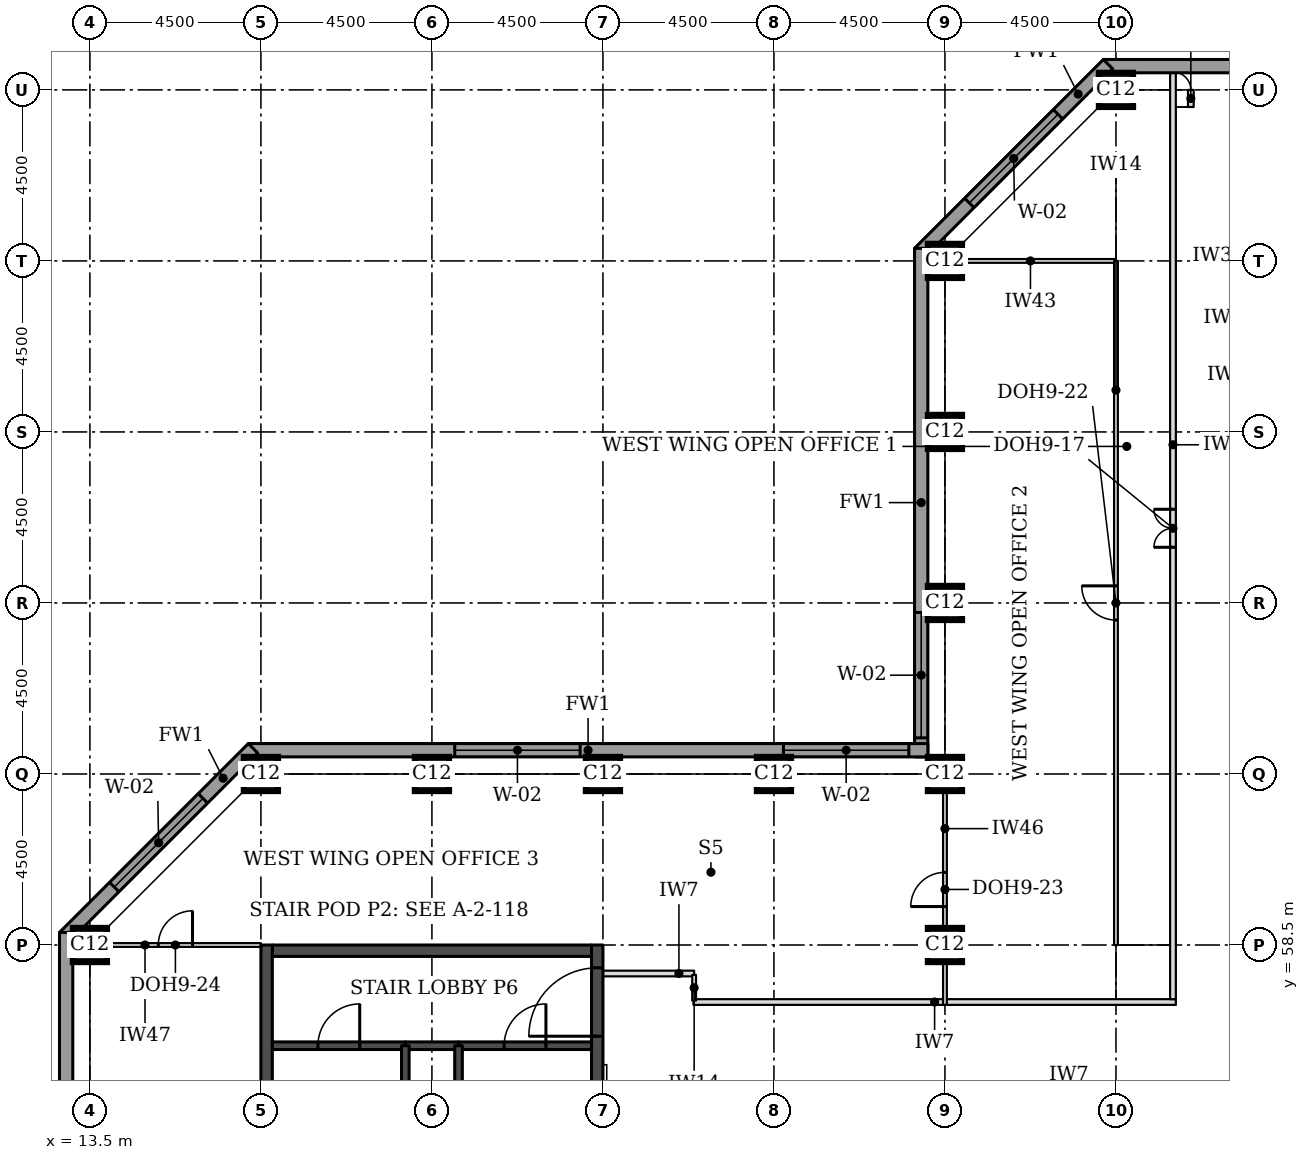
"""IFC4 building model, lengths in metres.
Left out: names, types, materials, properties, quantities, classifications, styles, units other than length and angle.
Written with IfcOpenShell. Run it as: python <this file> out.ifc"""

import sys

from ifc_helpers import new_model, si_unit, direction, frame, frame_2d, origin, origin_2d, place, context, subcontext, project, spatial, rectangle, extrude, element, fill, save


model = new_model("IFC4")
c1 = context("Model", 3, precision=1e-05, world=origin(), true_north=direction((0.0, 1.0)))
c2 = subcontext(c1, "Body", "Model", "MODEL_VIEW")
j1 = project(units=[si_unit("LENGTHUNIT", "METRE"), si_unit("PLANEANGLEUNIT", "RADIAN")], contexts=[c1])
p1 = place(None, origin())
s1 = spatial("IfcSite", under=j1, at=p1, CompositionType="ELEMENT")
p2 = place(p1, origin())
s2 = spatial("IfcBuilding", under=s1, at=p2, CompositionType="ELEMENT")
p3 = place(p2, frame((0.0, 0.0, 219.3)))
s3 = spatial("IfcBuildingStorey", under=s2, at=p3, CompositionType="ELEMENT", Elevation=219.3)
for number, where, z_axis, x_axis in (
    (1, (13.5, 58.5, 0.0), (0.0, 0.0, 1.0), (1.0, 0.0, 0.0)),
    (2, (36.0, 58.5, 0.0), (0.0, 0.0, 1.0), (1.0, 0.0, 0.0)),
    (3, (18.0, 63.0, 0.0), (0.0, 0.0, 1.0), (1.0, 0.0, 0.0)),
    (4, (22.5, 63.0, 0.0), (0.0, 0.0, 1.0), (1.0, 0.0, 0.0)),
    (5, (27.0, 63.0, 0.0), (0.0, 0.0, 1.0), (1.0, 0.0, 0.0)),
    (6, (31.5, 63.0, 0.0), (0.0, 0.0, 1.0), (1.0, 0.0, 0.0)),
    (7, (36.0, 63.0, 0.0), (0.0, 0.0, 1.0), (1.0, 0.0, 0.0)),
    (8, (36.0, 67.5, 0.0), (0.0, 0.0, 1.0), (1.0, 0.0, 0.0)),
    (9, (36.0, 72.0, 0.0), (0.0, 0.0, 1.0), (1.0, 0.0, 0.0)),
    (10, (36.0, 76.5, 0.0), (0.0, 0.0, 1.0), (1.0, 0.0, 0.0)),
    (11, (40.5, 81.0, 0.0), (0.0, 0.0, 1.0), (1.0, 0.0, 0.0)),
):
    element("IfcColumn", number, at=place(p3, frame(where, z_axis=z_axis, x_axis=x_axis)), inside=s3, PredefinedType="COLUMN", context=c2, shape_type="SweptSolid", body=[
        extrude(rectangle(XDim=0.9, YDim=0.9, at=origin_2d()), origin(), (0.0, 0.0, 1.0), 3.7),
    ])
p4 = place(p3, frame((18.3, 58.35, 0.0), z_axis=(0.0, 0.0, 1.0), x_axis=(1.0, 0.0, 0.0)))
e12 = element("IfcWall", 12, at=p4, inside=s3, PredefinedType="SHEAR", context=c2, shape_type="SweptSolid", body=[
    extrude(rectangle(XDim=8.4, YDim=0.3, at=frame_2d((4.2, 0.0))), origin(), (0.0, 0.0, 1.0), 3.7),
])
p5 = place(p3, frame((18.15, 49.5, 0.0), z_axis=(0.0, 0.0, 1.0), x_axis=(0.0, 1.0, 0.0)))
e13 = element("IfcWall", 13, at=p5, inside=s3, PredefinedType="SHEAR", context=c2, shape_type="SweptSolid", body=[
    extrude(rectangle(XDim=9.0, YDim=0.3, at=frame_2d((4.5, 0.0))), origin(), (0.0, 0.0, 1.0), 3.7),
])
p6 = place(p3, frame((26.85, 49.5, 0.0), z_axis=(0.0, 0.0, 1.0), x_axis=(0.0, 1.0, 0.0)))
e14 = element("IfcWall", 14, at=p6, inside=s3, PredefinedType="SHEAR", context=c2, shape_type="SweptSolid", body=[
    extrude(rectangle(XDim=9.0, YDim=0.3, at=frame_2d((4.5, 0.0))), origin(), (0.0, 0.0, 1.0), 3.7),
])
p7 = place(p6, frame((6.6, 0.0, 0.0)))
e15 = element("IfcOpeningElement", 15, at=p7, cuts=e14, PredefinedType="OPENING", context=c2, shape_type="SweptSolid", body=[
    extrude(rectangle(XDim=1.8, YDim=2.1, at=frame_2d((0.9, 1.05))), frame((0.0, 0.16, 0.0), z_axis=(0.0, -1.0, 0.0), x_axis=(1.0, 0.0, 0.0)), (0.0, 0.0, 1.0), 0.32),
])
p8 = place(p3, frame((72.331, 81.625, 0.0), z_axis=(0.0, 0.0, 1.0), x_axis=(-1.0, 0.0, 0.0)))
e16 = element("IfcWall", 16, at=p8, inside=s3, PredefinedType="STANDARD", context=c2, shape_type="SweptSolid", body=[
    extrude(rectangle(XDim=32.163, YDim=0.35, at=frame_2d((16.081, 0.0))), origin(), (0.0, 0.0, 1.0), 3.525),
])
p9 = place(p8, frame((5.431, 0.0, 0.9)))
e17 = element("IfcOpeningElement", 17, at=p9, cuts=e16, PredefinedType="OPENING", context=c2, shape_type="SweptSolid", body=[
    extrude(rectangle(XDim=3.3, YDim=1.9, at=frame_2d((1.65, 0.95))), frame((0.0, 0.185, 0.0), z_axis=(0.0, -1.0, 0.0), x_axis=(1.0, 0.0, 0.0)), (0.0, 0.0, 1.0), 0.37),
])
p10 = place(p8, frame((9.931, 0.0, 0.9)))
e18 = element("IfcOpeningElement", 18, at=p10, cuts=e16, PredefinedType="OPENING", context=c2, shape_type="SweptSolid", body=[
    extrude(rectangle(XDim=3.3, YDim=1.9, at=frame_2d((1.65, 0.95))), frame((0.0, 0.185, 0.0), z_axis=(0.0, -1.0, 0.0), x_axis=(1.0, 0.0, 0.0)), (0.0, 0.0, 1.0), 0.37),
])
p11 = place(p8, frame((14.431, 0.0, 0.9)))
e19 = element("IfcOpeningElement", 19, at=p11, cuts=e16, PredefinedType="OPENING", context=c2, shape_type="SweptSolid", body=[
    extrude(rectangle(XDim=3.3, YDim=1.9, at=frame_2d((1.65, 0.95))), frame((0.0, 0.185, 0.0), z_axis=(0.0, -1.0, 0.0), x_axis=(1.0, 0.0, 0.0)), (0.0, 0.0, 1.0), 0.37),
])
p12 = place(p8, frame((18.931, 0.0, 0.9)))
e20 = element("IfcOpeningElement", 20, at=p12, cuts=e16, PredefinedType="OPENING", context=c2, shape_type="SweptSolid", body=[
    extrude(rectangle(XDim=3.3, YDim=1.9, at=frame_2d((1.65, 0.95))), frame((0.0, 0.185, 0.0), z_axis=(0.0, -1.0, 0.0), x_axis=(1.0, 0.0, 0.0)), (0.0, 0.0, 1.0), 0.37),
])
p13 = place(p8, frame((23.431, 0.0, 0.9)))
e21 = element("IfcOpeningElement", 21, at=p13, cuts=e16, PredefinedType="OPENING", context=c2, shape_type="SweptSolid", body=[
    extrude(rectangle(XDim=3.3, YDim=1.9, at=frame_2d((1.65, 0.95))), frame((0.0, 0.185, 0.0), z_axis=(0.0, -1.0, 0.0), x_axis=(1.0, 0.0, 0.0)), (0.0, 0.0, 1.0), 0.37),
])
p14 = place(p3, frame((40.292, 81.676, 0.0), z_axis=(0.0, 0.0, 1.0), x_axis=(-0.707106781187, -0.707106781187, 0.0)))
e22 = element("IfcWall", 22, at=p14, inside=s3, PredefinedType="STANDARD", context=c2, shape_type="SweptSolid", body=[
    extrude(rectangle(XDim=7.027, YDim=0.35, at=frame_2d((3.513, 0.0))), origin(), (0.0, 0.0, 1.0), 3.525),
])
p15 = place(p14, frame((1.863, 0.0, 0.9)))
e23 = element("IfcOpeningElement", 23, at=p15, cuts=e22, PredefinedType="OPENING", context=c2, shape_type="SweptSolid", body=[
    extrude(rectangle(XDim=3.3, YDim=1.9, at=frame_2d((1.65, 0.95))), frame((0.0, 0.185, 0.0), z_axis=(0.0, -1.0, 0.0), x_axis=(1.0, 0.0, 0.0)), (0.0, 0.0, 1.0), 0.37),
])
p16 = place(p3, frame((35.375, 76.831, 0.0), z_axis=(0.0, 0.0, 1.0), x_axis=(0.0, -1.0, 0.0)))
e24 = element("IfcWall", 24, at=p16, inside=s3, PredefinedType="STANDARD", context=c2, shape_type="SweptSolid", body=[
    extrude(rectangle(XDim=13.381, YDim=0.35, at=frame_2d((6.691, 0.0))), origin(), (0.0, 0.0, 1.0), 3.525),
])
p17 = place(p16, frame((9.581, 0.0, 0.9)))
e25 = element("IfcOpeningElement", 25, at=p17, cuts=e24, PredefinedType="OPENING", context=c2, shape_type="SweptSolid", body=[
    extrude(rectangle(XDim=3.3, YDim=1.9, at=frame_2d((1.65, 0.95))), frame((0.0, 0.185, 0.0), z_axis=(0.0, -1.0, 0.0), x_axis=(1.0, 0.0, 0.0)), (0.0, 0.0, 1.0), 0.37),
])
p18 = place(p3, frame((35.55, 63.625, 0.0), z_axis=(0.0, 0.0, 1.0), x_axis=(-1.0, 0.0, 0.0)))
e26 = element("IfcWall", 26, at=p18, inside=s3, PredefinedType="STANDARD", context=c2, shape_type="SweptSolid", body=[
    extrude(rectangle(XDim=17.881, YDim=0.35, at=frame_2d((8.941, 0.0))), origin(), (0.0, 0.0, 1.0), 3.525),
])
p19 = place(p18, frame((0.5, 0.0, 0.9)))
e27 = element("IfcOpeningElement", 27, at=p19, cuts=e26, PredefinedType="OPENING", context=c2, shape_type="SweptSolid", body=[
    extrude(rectangle(XDim=3.3, YDim=1.9, at=frame_2d((1.65, 0.95))), frame((0.0, 0.185, 0.0), z_axis=(0.0, -1.0, 0.0), x_axis=(1.0, 0.0, 0.0)), (0.0, 0.0, 1.0), 0.37),
])
p20 = place(p18, frame((9.15, 0.0, 0.9)))
e28 = element("IfcOpeningElement", 28, at=p20, cuts=e26, PredefinedType="OPENING", context=c2, shape_type="SweptSolid", body=[
    extrude(rectangle(XDim=3.3, YDim=1.9, at=frame_2d((1.65, 0.95))), frame((0.0, 0.185, 0.0), z_axis=(0.0, -1.0, 0.0), x_axis=(1.0, 0.0, 0.0)), (0.0, 0.0, 1.0), 0.37),
])
p21 = place(p3, frame((17.792, 63.676, 0.0), z_axis=(0.0, 0.0, 1.0), x_axis=(-0.707106781187, -0.707106781187, 0.0)))
e29 = element("IfcWall", 29, at=p21, inside=s3, PredefinedType="STANDARD", context=c2, shape_type="SweptSolid", body=[
    extrude(rectangle(XDim=7.027, YDim=0.35, at=frame_2d((3.513, 0.0))), origin(), (0.0, 0.0, 1.0), 3.525),
])
p22 = place(p21, frame((1.863, 0.0, 0.9)))
e30 = element("IfcOpeningElement", 30, at=p22, cuts=e29, PredefinedType="OPENING", context=c2, shape_type="SweptSolid", body=[
    extrude(rectangle(XDim=3.3, YDim=1.9, at=frame_2d((1.65, 0.95))), frame((0.0, 0.185, 0.0), z_axis=(0.0, -1.0, 0.0), x_axis=(1.0, 0.0, 0.0)), (0.0, 0.0, 1.0), 0.37),
])
p23 = place(p3, frame((12.875, 58.831, 0.0), z_axis=(0.0, 0.0, 1.0), x_axis=(0.0, -1.0, 0.0)))
e31 = element("IfcWall", 31, at=p23, inside=s3, PredefinedType="STANDARD", context=c2, shape_type="SweptSolid", body=[
    extrude(rectangle(XDim=14.163, YDim=0.35, at=frame_2d((7.081, 0.0))), origin(), (0.0, 0.0, 1.0), 3.525),
])
p24 = place(p23, frame((5.431, 0.0, 0.9)))
e32 = element("IfcOpeningElement", 32, at=p24, cuts=e31, PredefinedType="OPENING", context=c2, shape_type="SweptSolid", body=[
    extrude(rectangle(XDim=3.3, YDim=1.9, at=frame_2d((1.65, 0.95))), frame((0.0, 0.185, 0.0), z_axis=(0.0, -1.0, 0.0), x_axis=(1.0, 0.0, 0.0)), (0.0, 0.0, 1.0), 0.37),
])
p25 = place(p3, frame((29.38, 57.0, 0.0), z_axis=(0.0, 0.0, 1.0), x_axis=(1.0, 0.0, 0.0)))
e33 = element("IfcWall", 33, at=p25, inside=s3, PredefinedType="PARTITIONING", context=c2, shape_type="SweptSolid", body=[
    extrude(rectangle(XDim=12.695, YDim=0.15, at=frame_2d((6.348, 0.0))), origin(), (0.0, 0.0, 1.0), 3.55),
])
p26 = place(p3, frame((42.0, 57.075, 0.0), z_axis=(0.0, 0.0, 1.0), x_axis=(0.0, 1.0, 0.0)))
e34 = element("IfcWall", 34, at=p26, inside=s3, PredefinedType="PARTITIONING", context=c2, shape_type="SweptSolid", body=[
    extrude(rectangle(XDim=24.375, YDim=0.15, at=frame_2d((12.188, 0.0))), origin(), (0.0, 0.0, 1.0), 3.55),
])
p27 = place(p26, frame((11.89, 0.0, 0.0)))
e35 = element("IfcOpeningElement", 35, at=p27, cuts=e34, PredefinedType="OPENING", context=c2, shape_type="SweptSolid", body=[
    extrude(rectangle(XDim=1.0, YDim=2.1, at=frame_2d((0.5, 1.05))), frame((0.0, 0.085, 0.0), z_axis=(0.0, -1.0, 0.0), x_axis=(1.0, 0.0, 0.0)), (0.0, 0.0, 1.0), 0.17),
])
p28 = place(p3, frame((36.0, 76.5, 0.0), z_axis=(0.0, 0.0, 1.0), x_axis=(1.0, 0.0, 0.0)))
e36 = element("IfcWall", 36, at=p28, inside=s3, PredefinedType="PARTITIONING", context=c2, shape_type="SweptSolid", body=[
    extrude(rectangle(XDim=4.5, YDim=0.1, at=frame_2d((2.25, 0.0))), origin(), (0.0, 0.0, 1.0), 3.096),
])
p29 = place(p3, frame((40.5, 76.5, 0.0), z_axis=(0.0, 0.0, 1.0), x_axis=(0.0, -1.0, 0.0)))
e37 = element("IfcWall", 37, at=p29, inside=s3, PredefinedType="PARTITIONING", context=c2, shape_type="SweptSolid", body=[
    extrude(rectangle(XDim=18.0, YDim=0.1, at=frame_2d((9.0, 0.0))), origin(), (0.0, 0.0, 1.0), 3.55),
])
p30 = place(p29, frame((8.55, 0.0, 0.0)))
e38 = element("IfcOpeningElement", 38, at=p30, cuts=e37, PredefinedType="OPENING", context=c2, shape_type="SweptSolid", body=[
    extrude(rectangle(XDim=0.9, YDim=2.1, at=frame_2d((0.45, 1.05))), frame((0.0, 0.06, 0.0), z_axis=(0.0, -1.0, 0.0), x_axis=(1.0, 0.0, 0.0)), (0.0, 0.0, 1.0), 0.12),
])
p31 = place(p3, frame((36.0, 63.0, 0.0), z_axis=(0.0, 0.0, 1.0), x_axis=(0.0, -1.0, 0.0)))
e39 = element("IfcWall", 39, at=p31, inside=s3, PredefinedType="PARTITIONING", context=c2, shape_type="SweptSolid", body=[
    extrude(rectangle(XDim=6.075, YDim=0.1, at=frame_2d((3.038, 0.0))), origin(), (0.0, 0.0, 1.0), 2.8),
])
p32 = place(p31, frame((2.588, 0.0, 0.0)))
e40 = element("IfcOpeningElement", 40, at=p32, cuts=e39, PredefinedType="OPENING", context=c2, shape_type="SweptSolid", body=[
    extrude(rectangle(XDim=0.9, YDim=2.1, at=frame_2d((0.45, 1.05))), frame((0.0, 0.06, 0.0), z_axis=(0.0, -1.0, 0.0), x_axis=(1.0, 0.0, 0.0)), (0.0, 0.0, 1.0), 0.12),
])
p33 = place(p3, frame((13.5, 58.5, 0.0), z_axis=(0.0, 0.0, 1.0), x_axis=(1.0, 0.0, 0.0)))
e41 = element("IfcWall", 41, at=p33, inside=s3, PredefinedType="PARTITIONING", context=c2, shape_type="SweptSolid", body=[
    extrude(rectangle(XDim=4.5, YDim=0.1, at=frame_2d((2.25, 0.0))), origin(), (0.0, 0.0, 1.0), 2.55),
])
p34 = place(p33, frame((1.8, 0.0, 0.0)))
e42 = element("IfcOpeningElement", 42, at=p34, cuts=e41, PredefinedType="OPENING", context=c2, shape_type="SweptSolid", body=[
    extrude(rectangle(XDim=0.9, YDim=2.1, at=frame_2d((0.45, 1.05))), frame((0.0, 0.06, 0.0), z_axis=(0.0, -1.0, 0.0), x_axis=(1.0, 0.0, 0.0)), (0.0, 0.0, 1.0), 0.12),
])
p35 = place(p3, frame((42.47, 80.55, 0.0), z_axis=(0.0, 0.0, 1.0), x_axis=(0.0, 1.0, 0.0)))
e43 = element("IfcWall", 43, at=p35, inside=s3, PredefinedType="PARTITIONING", context=c2, shape_type="SweptSolid", body=[
    extrude(rectangle(XDim=0.45, YDim=0.15, at=frame_2d((0.225, 0.0))), origin(), (0.0, 0.0, 1.0), 3.55),
])
p36 = place(p3, frame((27.0, 57.75, 0.0), z_axis=(0.0, 0.0, 1.0), x_axis=(1.0, 0.0, 0.0)))
e44 = element("IfcWall", 44, at=p36, inside=s3, PredefinedType="PARTITIONING", context=c2, shape_type="SweptSolid", body=[
    extrude(rectangle(XDim=2.4, YDim=0.15, at=frame_2d((1.2, 0.0))), origin(), (0.0, 0.0, 1.0), 3.55),
])
p37 = place(p3, frame((29.4, 57.715, 0.0), z_axis=(0.0, 0.0, 1.0), x_axis=(0.0, -1.0, 0.0)))
e45 = element("IfcWall", 45, at=p37, inside=s3, PredefinedType="PARTITIONING", context=c2, shape_type="SweptSolid", body=[
    extrude(rectangle(XDim=0.68, YDim=0.1, at=frame_2d((0.34, 0.0))), origin(), (0.0, 0.0, 1.0), 3.55),
])
p38 = place(p3, frame((21.8, 55.85, 0.0), z_axis=(0.0, 0.0, 1.0), x_axis=(1.0, 0.0, 0.0)))
e46 = element("IfcWall", 46, at=p38, inside=s3, PredefinedType="SOLIDWALL", context=c2, shape_type="SweptSolid", body=[
    extrude(rectangle(XDim=1.4, YDim=0.2, at=frame_2d((0.7, 0.0))), origin(), (0.0, 0.0, 1.0), 3.55),
])
p39 = place(p3, frame((18.3, 55.85, 0.0), z_axis=(0.0, 0.0, 1.0), x_axis=(1.0, 0.0, 0.0)))
e47 = element("IfcWall", 47, at=p39, inside=s3, PredefinedType="SOLIDWALL", context=c2, shape_type="SweptSolid", body=[
    extrude(rectangle(XDim=3.5, YDim=0.2, at=frame_2d((1.75, 0.0))), origin(), (0.0, 0.0, 1.0), 3.55),
])
p40 = place(p39, frame((1.2, 0.0, 0.0)))
e48 = element("IfcOpeningElement", 48, at=p40, cuts=e47, PredefinedType="OPENING", context=c2, shape_type="SweptSolid", body=[
    extrude(rectangle(XDim=1.1, YDim=2.1, at=frame_2d((0.55, 1.05))), frame((0.0, 0.11, 0.0), z_axis=(0.0, -1.0, 0.0), x_axis=(1.0, 0.0, 0.0)), (0.0, 0.0, 1.0), 0.22),
])
p41 = place(p3, frame((23.2, 55.85, 0.0), z_axis=(0.0, 0.0, 1.0), x_axis=(1.0, 0.0, 0.0)))
e49 = element("IfcWall", 49, at=p41, inside=s3, PredefinedType="SOLIDWALL", context=c2, shape_type="SweptSolid", body=[
    extrude(rectangle(XDim=3.5, YDim=0.2, at=frame_2d((1.75, 0.0))), origin(), (0.0, 0.0, 1.0), 3.55),
])
p42 = place(p41, frame((1.2, 0.0, 0.0)))
e50 = element("IfcOpeningElement", 50, at=p42, cuts=e49, PredefinedType="OPENING", context=c2, shape_type="SweptSolid", body=[
    extrude(rectangle(XDim=1.1, YDim=2.1, at=frame_2d((0.55, 1.05))), frame((0.0, 0.11, 0.0), z_axis=(0.0, -1.0, 0.0), x_axis=(1.0, 0.0, 0.0)), (0.0, 0.0, 1.0), 0.22),
])
for number, where, z_axis, x_axis in (
    (51, (21.8, 49.8, 0.0), (0.0, 0.0, 1.0), (0.0, 1.0, 0.0)),
    (52, (23.2, 49.8, 0.0), (0.0, 0.0, 1.0), (0.0, 1.0, 0.0)),
):
    element("IfcWall", number, at=place(p3, frame(where, z_axis=z_axis, x_axis=x_axis)), inside=s3, PredefinedType="SOLIDWALL", context=c2, shape_type="SweptSolid", body=[
        extrude(rectangle(XDim=6.05, YDim=0.2, at=frame_2d((3.025, 0.0))), origin(), (0.0, 0.0, 1.0), 3.55),
    ])
p43 = place(p15, origin())
e53 = element("IfcWindow", 53, at=p43, inside=s3, PartitioningType="SINGLE_PANEL", PredefinedType="WINDOW", context=c2, shape_type="SweptSolid", body=[
    extrude(rectangle(XDim=3.3, YDim=1.9, at=frame_2d((1.65, 0.95))), frame((0.0, 0.085, 0.0), z_axis=(0.0, -1.0, 0.0), x_axis=(1.0, 0.0, 0.0)), (0.0, 0.0, 1.0), 0.06),
])
fill(e23, e53)
p44 = place(p17, origin())
e54 = element("IfcWindow", 54, at=p44, inside=s3, PartitioningType="SINGLE_PANEL", PredefinedType="WINDOW", context=c2, shape_type="SweptSolid", body=[
    extrude(rectangle(XDim=3.3, YDim=1.9, at=frame_2d((1.65, 0.95))), frame((0.0, 0.085, 0.0), z_axis=(0.0, -1.0, 0.0), x_axis=(1.0, 0.0, 0.0)), (0.0, 0.0, 1.0), 0.06),
])
fill(e25, e54)
p45 = place(p19, origin())
e55 = element("IfcWindow", 55, at=p45, inside=s3, PartitioningType="SINGLE_PANEL", PredefinedType="WINDOW", context=c2, shape_type="SweptSolid", body=[
    extrude(rectangle(XDim=3.3, YDim=1.9, at=frame_2d((1.65, 0.95))), frame((0.0, 0.085, 0.0), z_axis=(0.0, -1.0, 0.0), x_axis=(1.0, 0.0, 0.0)), (0.0, 0.0, 1.0), 0.06),
])
fill(e27, e55)
p46 = place(p20, origin())
e56 = element("IfcWindow", 56, at=p46, inside=s3, PartitioningType="SINGLE_PANEL", PredefinedType="WINDOW", context=c2, shape_type="SweptSolid", body=[
    extrude(rectangle(XDim=3.3, YDim=1.9, at=frame_2d((1.65, 0.95))), frame((0.0, 0.085, 0.0), z_axis=(0.0, -1.0, 0.0), x_axis=(1.0, 0.0, 0.0)), (0.0, 0.0, 1.0), 0.06),
])
fill(e28, e56)
p47 = place(p22, origin())
e57 = element("IfcWindow", 57, at=p47, inside=s3, PartitioningType="SINGLE_PANEL", PredefinedType="WINDOW", context=c2, shape_type="SweptSolid", body=[
    extrude(rectangle(XDim=3.3, YDim=1.9, at=frame_2d((1.65, 0.95))), frame((0.0, 0.085, 0.0), z_axis=(0.0, -1.0, 0.0), x_axis=(1.0, 0.0, 0.0)), (0.0, 0.0, 1.0), 0.06),
])
fill(e30, e57)
p48 = place(p27, origin())
e58 = element("IfcDoor", 58, at=p48, inside=s3, OperationType="DOUBLE_DOOR_SINGLE_SWING", PredefinedType="DOOR", context=c2, shape_type="SweptSolid", body=[
    extrude(rectangle(XDim=1.0, YDim=2.1, at=frame_2d((0.5, 1.05))), frame((0.0, 0.025, 0.0), z_axis=(0.0, -1.0, 0.0), x_axis=(1.0, 0.0, 0.0)), (0.0, 0.0, 1.0), 0.05),
])
fill(e35, e58)
p49 = place(p30, frame((0.9, 0.0, 0.0), z_axis=(0.0, 0.0, 1.0), x_axis=(-1.0, 0.0, 0.0)))
e59 = element("IfcDoor", 59, at=p49, inside=s3, OperationType="SINGLE_SWING_RIGHT", PredefinedType="DOOR", context=c2, shape_type="SweptSolid", body=[
    extrude(rectangle(XDim=0.9, YDim=2.1, at=frame_2d((0.45, 1.05))), frame((0.0, 0.025, 0.0), z_axis=(0.0, -1.0, 0.0), x_axis=(1.0, 0.0, 0.0)), (0.0, 0.0, 1.0), 0.05),
])
fill(e38, e59)
p50 = place(p32, frame((0.9, 0.0, 0.0), z_axis=(0.0, 0.0, 1.0), x_axis=(-1.0, 0.0, 0.0)))
e60 = element("IfcDoor", 60, at=p50, inside=s3, OperationType="SINGLE_SWING_LEFT", PredefinedType="DOOR", context=c2, shape_type="SweptSolid", body=[
    extrude(rectangle(XDim=0.9, YDim=2.1, at=frame_2d((0.45, 1.05))), frame((0.0, 0.025, 0.0), z_axis=(0.0, -1.0, 0.0), x_axis=(1.0, 0.0, 0.0)), (0.0, 0.0, 1.0), 0.05),
])
fill(e40, e60)
p51 = place(p34, origin())
e61 = element("IfcDoor", 61, at=p51, inside=s3, OperationType="SINGLE_SWING_RIGHT", PredefinedType="DOOR", context=c2, shape_type="SweptSolid", body=[
    extrude(rectangle(XDim=0.9, YDim=2.1, at=frame_2d((0.45, 1.05))), frame((0.0, 0.025, 0.0), z_axis=(0.0, -1.0, 0.0), x_axis=(1.0, 0.0, 0.0)), (0.0, 0.0, 1.0), 0.05),
])
fill(e42, e61)
p52 = place(p40, origin())
e62 = element("IfcDoor", 62, at=p52, inside=s3, OperationType="SINGLE_SWING_RIGHT", PredefinedType="DOOR", context=c2, shape_type="SweptSolid", body=[
    extrude(rectangle(XDim=1.1, YDim=2.1, at=frame_2d((0.55, 1.05))), frame((0.0, 0.025, 0.0), z_axis=(0.0, -1.0, 0.0), x_axis=(1.0, 0.0, 0.0)), (0.0, 0.0, 1.0), 0.05),
])
fill(e48, e62)
p53 = place(p42, origin())
e63 = element("IfcDoor", 63, at=p53, inside=s3, OperationType="SINGLE_SWING_RIGHT", PredefinedType="DOOR", context=c2, shape_type="SweptSolid", body=[
    extrude(rectangle(XDim=1.1, YDim=2.1, at=frame_2d((0.55, 1.05))), frame((0.0, 0.025, 0.0), z_axis=(0.0, -1.0, 0.0), x_axis=(1.0, 0.0, 0.0)), (0.0, 0.0, 1.0), 0.05),
])
fill(e50, e63)
p54 = place(p7, origin())
e64 = element("IfcDoor", 64, at=p54, inside=s3, OperationType="SINGLE_SWING_LEFT", PredefinedType="DOOR", context=c2, shape_type="SweptSolid", body=[
    extrude(rectangle(XDim=1.8, YDim=2.1, at=frame_2d((0.9, 1.05))), frame((0.0, 0.025, 0.0), z_axis=(0.0, -1.0, 0.0), x_axis=(1.0, 0.0, 0.0)), (0.0, 0.0, 1.0), 0.05),
])
fill(e15, e64)
save(model, sys.argv[1])
